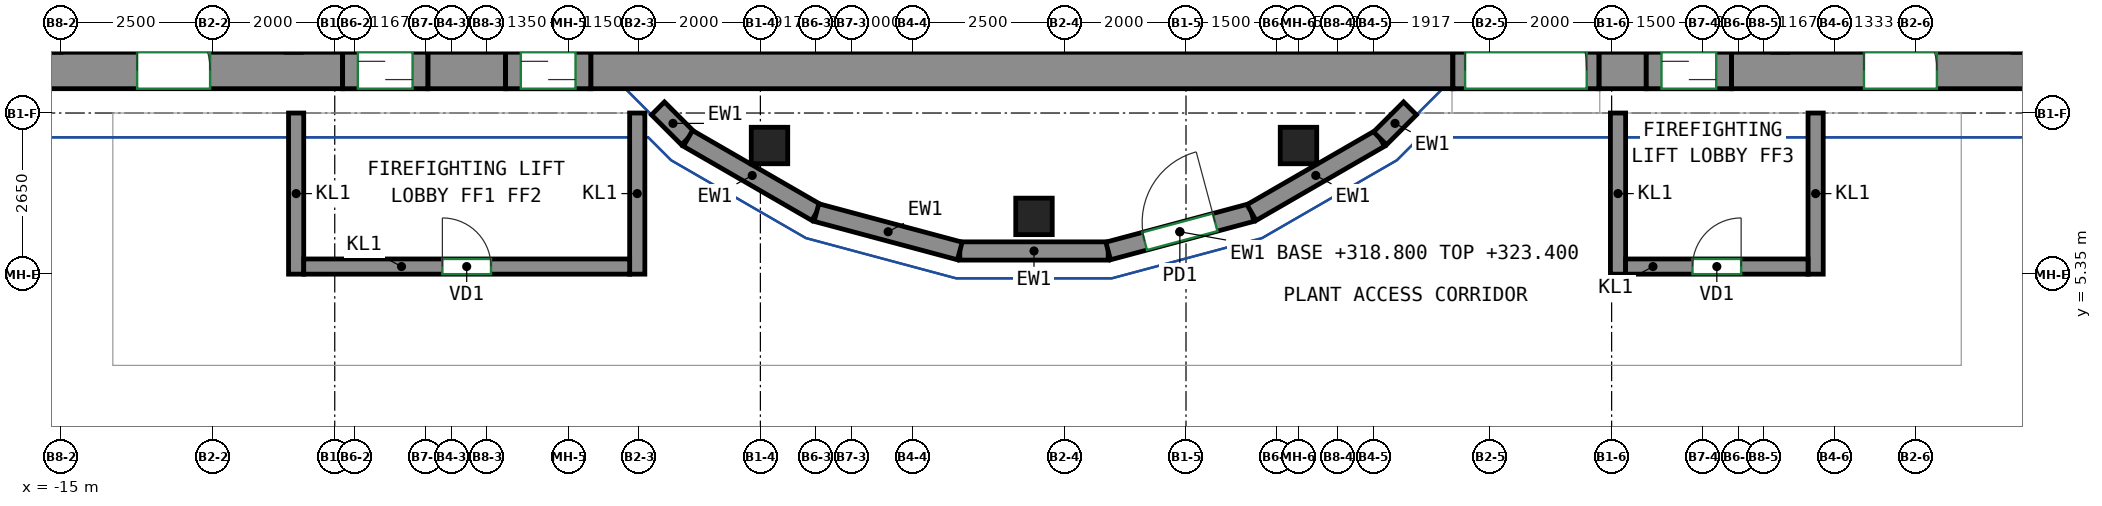
"""IFC4 building model, lengths in metres.
Left out: names, types, materials, properties, quantities, classifications, styles, units other than length and angle.
Written with IfcOpenShell. Run it as: python <this file> out.ifc"""

import sys

from ifc_helpers import new_model, si_unit, direction, frame, frame_2d, origin, origin_2d, place, context, subcontext, project, spatial, rectangle, extrude, source, transform, mapped, element, fill, save


model = new_model("IFC4")
c1 = context("Model", 3, precision=1e-05, world=origin(), true_north=direction((0.0, 1.0)))
c2 = subcontext(c1, "Body", "Model", "MODEL_VIEW")
j1 = project(units=[si_unit("LENGTHUNIT", "METRE"), si_unit("PLANEANGLEUNIT", "RADIAN")], contexts=[c1])
p1 = place(None, origin())
s1 = spatial("IfcSite", under=j1, at=p1, CompositionType="ELEMENT")
p2 = place(p1, origin())
s2 = spatial("IfcBuilding", under=s1, at=p2, CompositionType="ELEMENT")
p3 = place(p2, frame((0.0, 0.0, 318.8)))
s3 = spatial("IfcBuildingStorey", under=s2, at=p3, CompositionType="ELEMENT", Elevation=318.8)
m1 = source(origin(), c2, "Body", "SweptSolid", [
    extrude(rectangle(XDim=0.6, YDim=0.6, at=origin_2d()), origin(), (0.0, 0.0, 1.0), 4.6),
])
for number, where, z_axis, x_axis in (
    (1, (-3.35, 7.466, 0.0), (0.0, 0.0, 1.0), (1.0, 0.0, 0.0)),
    (2, (1.0, 6.3, 0.0), (0.0, 0.0, 1.0), (1.0, 0.0, 0.0)),
    (3, (5.35, 7.466, 0.0), (0.0, 0.0, 1.0), (1.0, 0.0, 0.0)),
):
    element("IfcColumn", number, at=place(p3, frame(where, z_axis=z_axis, x_axis=x_axis)), inside=s3, PredefinedType="COLUMN", context=c2, shape_type="MappedRepresentation", body=[
        mapped(m1, transform((0.0, 0.0, 0.0))),
    ])
m2 = source(origin(), c2, "Body", "SweptSolid", [
    extrude(rectangle(XDim=5.23, YDim=0.6, at=frame_2d((2.615, 0.0))), origin(), (0.0, 0.0, 1.0), 5.0),
])
p4 = place(p3, frame((-15.6, 8.7, -0.4), z_axis=(0.0, 0.0, 1.0), x_axis=(1.0, 0.0, 0.0)))
e4 = element("IfcWall", 4, at=p4, inside=s3, PredefinedType="SHEAR", context=c2, shape_type="MappedRepresentation", body=[
    mapped(m2, transform((0.0, 0.0, 0.0))),
])
p5 = place(p4, frame((1.85, 0.0, 0.4)))
e5 = element("IfcOpeningElement", 5, at=p5, cuts=e4, PredefinedType="OPENING", context=c2, shape_type="SweptSolid", body=[
    extrude(rectangle(XDim=1.2, YDim=2.1, at=frame_2d((0.6, 1.05))), frame((0.0, 0.31, 0.0), z_axis=(0.0, -1.0, 0.0), x_axis=(1.0, 0.0, 0.0)), (0.0, 0.0, 1.0), 0.62),
])
m3 = source(origin(), c2, "Body", "SweptSolid", [
    extrude(rectangle(XDim=1.28, YDim=0.6, at=frame_2d((0.64, 0.0))), origin(), (0.0, 0.0, 1.0), 5.0),
])
p6 = place(p3, frame((-8.97, 8.7, -0.4), z_axis=(0.0, 0.0, 1.0), x_axis=(1.0, 0.0, 0.0)))
e6 = element("IfcWall", 6, at=p6, inside=s3, PredefinedType="SHEAR", context=c2, shape_type="MappedRepresentation", body=[
    mapped(m3, transform((0.0, 0.0, 0.0))),
])
m4 = source(origin(), c2, "Body", "SweptSolid", [
    extrude(rectangle(XDim=14.18, YDim=0.6, at=frame_2d((7.09, 0.0))), origin(), (0.0, 0.0, 1.0), 4.6),
])
p7 = place(p3, frame((-6.29, 8.7, 0.0), z_axis=(0.0, 0.0, 1.0), x_axis=(1.0, 0.0, 0.0)))
e7 = element("IfcWall", 7, at=p7, inside=s3, PredefinedType="SHEAR", context=c2, shape_type="MappedRepresentation", body=[
    mapped(m4, transform((0.0, 0.0, 0.0))),
])
m5 = source(origin(), c2, "Body", "SweptSolid", [
    extrude(rectangle(XDim=0.78, YDim=0.6, at=frame_2d((0.39, 0.0))), origin(), (0.0, 0.0, 1.0), 5.0),
])
p8 = place(p3, frame((10.29, 8.7, -0.4), z_axis=(0.0, 0.0, 1.0), x_axis=(1.0, 0.0, 0.0)))
e8 = element("IfcWall", 8, at=p8, inside=s3, PredefinedType="SHEAR", context=c2, shape_type="MappedRepresentation", body=[
    mapped(m5, transform((0.0, 0.0, 0.0))),
])
p9 = place(p3, frame((12.47, 8.7, -0.4), z_axis=(0.0, 0.0, 1.0), x_axis=(1.0, 0.0, 0.0)))
e9 = element("IfcWall", 9, at=p9, inside=s3, PredefinedType="SHEAR", context=c2, shape_type="MappedRepresentation", body=[
    mapped(m2, transform((0.0, 0.0, 0.0))),
])
p10 = place(p9, frame((2.18, 0.0, 0.4)))
e10 = element("IfcOpeningElement", 10, at=p10, cuts=e9, PredefinedType="OPENING", context=c2, shape_type="SweptSolid", body=[
    extrude(rectangle(XDim=1.2, YDim=2.1, at=frame_2d((0.6, 1.05))), frame((0.0, 0.31, 0.0), z_axis=(0.0, -1.0, 0.0), x_axis=(1.0, 0.0, 0.0)), (0.0, 0.0, 1.0), 0.62),
])
m6 = source(origin(), c2, "Body", "SweptSolid", [
    extrude(rectangle(XDim=1.4, YDim=0.6, at=frame_2d((0.7, 0.0))), origin(), (0.0, 0.0, 1.0), 0.7),
])
p11 = place(p3, frame((-10.37, 8.7, 3.9), z_axis=(0.0, 0.0, 1.0), x_axis=(1.0, 0.0, 0.0)))
e11 = element("IfcWall", 11, at=p11, inside=s3, PredefinedType="SHEAR", context=c2, shape_type="MappedRepresentation", body=[
    mapped(m6, transform((0.0, 0.0, 0.0))),
])
m7 = source(origin(), c2, "Body", "SweptSolid", [
    extrude(rectangle(XDim=1.4, YDim=0.6, at=frame_2d((0.7, 0.0))), origin(), (0.0, 0.0, 1.0), 0.65),
])
p12 = place(p3, frame((-7.69, 8.7, 3.95), z_axis=(0.0, 0.0, 1.0), x_axis=(1.0, 0.0, 0.0)))
e12 = element("IfcWall", 12, at=p12, inside=s3, PredefinedType="SHEAR", context=c2, shape_type="MappedRepresentation", body=[
    mapped(m7, transform((0.0, 0.0, 0.0))),
])
m8 = source(origin(), c2, "Body", "SweptSolid", [
    extrude(rectangle(XDim=2.4, YDim=0.6, at=frame_2d((1.2, 0.0))), origin(), (0.0, 0.0, 1.0), 0.4),
])
p13 = place(p3, frame((7.89, 8.7, 4.2), z_axis=(0.0, 0.0, 1.0), x_axis=(1.0, 0.0, 0.0)))
e13 = element("IfcWall", 13, at=p13, inside=s3, PredefinedType="SHEAR", context=c2, shape_type="MappedRepresentation", body=[
    mapped(m8, transform((0.0, 0.0, 0.0))),
])
p14 = place(p3, frame((11.07, 8.7, 3.95), z_axis=(0.0, 0.0, 1.0), x_axis=(1.0, 0.0, 0.0)))
e14 = element("IfcWall", 14, at=p14, inside=s3, PredefinedType="SHEAR", context=c2, shape_type="MappedRepresentation", body=[
    mapped(m7, transform((0.0, 0.0, 0.0))),
])
m9 = source(origin(), c2, "Body", "SweptSolid", [
    extrude(rectangle(XDim=2.44, YDim=0.3, at=frame_2d((1.22, 0.0))), origin(), (0.0, 0.0, 1.0), 1.2),
])
p15 = place(p3, frame((-0.22, 5.731, 0.0), z_axis=(0.0, 0.0, 1.0), x_axis=(1.0, 0.0, 0.0)))
e15 = element("IfcWall", 15, at=p15, inside=s3, PredefinedType="SOLIDWALL", context=c2, shape_type="MappedRepresentation", body=[
    mapped(m9, transform((0.0, 0.0, 0.0))),
])
m10 = source(origin(), c2, "Body", "SweptSolid", [
    extrude(rectangle(XDim=2.441, YDim=0.3, at=frame_2d((1.22, 0.0))), origin(), (0.0, 0.0, 1.0), 4.6),
])
p16 = place(p3, frame((2.22, 5.731, 0.0), z_axis=(0.0, 0.0, 1.0), x_axis=(0.96593376363, 0.258789420724, 0.0)))
e16 = element("IfcWall", 16, at=p16, inside=s3, PredefinedType="SOLIDWALL", context=c2, shape_type="MappedRepresentation", body=[
    mapped(m10, transform((0.0, 0.0, 0.0))),
])
p17 = place(p16, frame((0.62, 0.0, 0.0)))
e17 = element("IfcOpeningElement", 17, at=p17, cuts=e16, PredefinedType="OPENING", context=c2, shape_type="SweptSolid", body=[
    extrude(rectangle(XDim=1.2, YDim=2.1, at=frame_2d((0.6, 1.05))), frame((0.0, 0.16, 0.0), z_axis=(0.0, -1.0, 0.0), x_axis=(1.0, 0.0, 0.0)), (0.0, 0.0, 1.0), 0.32),
])
p18 = place(p3, frame((4.578, 6.363, 0.0), z_axis=(0.0, 0.0, 1.0), x_axis=(0.866030657337, 0.49999090047, 0.0)))
e18 = element("IfcWall", 18, at=p18, inside=s3, PredefinedType="SOLIDWALL", context=c2, shape_type="MappedRepresentation", body=[
    mapped(m9, transform((0.0, 0.0, 0.0))),
])
m11 = source(origin(), c2, "Body", "SweptSolid", [
    extrude(rectangle(XDim=0.697, YDim=0.3, at=frame_2d((0.349, 0.0))), origin(), (0.0, 0.0, 1.0), 1.2),
])
for number, where, z_axis, x_axis in (
    (19, (6.691, 7.583, 0.0), (0.0, 0.0, 1.0), (0.707, 0.707, 0.0)),
    (20, (-5.184, 8.076, 0.0), (0.0, 0.0, 1.0), (0.707, -0.707, 0.0)),
):
    element("IfcWall", number, at=place(p3, frame(where, z_axis=z_axis, x_axis=x_axis)), inside=s3, PredefinedType="SOLIDWALL", context=c2, shape_type="MappedRepresentation", body=[
        mapped(m11, transform((0.0, 0.0, 0.0))),
    ])
p19 = place(p3, frame((-4.691, 7.583, 0.0), z_axis=(0.0, 0.0, 1.0), x_axis=(0.866030657337, -0.49999090047, 0.0)))
e21 = element("IfcWall", 21, at=p19, inside=s3, PredefinedType="SOLIDWALL", context=c2, shape_type="MappedRepresentation", body=[
    mapped(m9, transform((0.0, 0.0, 0.0))),
])
m12 = source(origin(), c2, "Body", "SweptSolid", [
    extrude(rectangle(XDim=2.441, YDim=0.3, at=frame_2d((1.22, 0.0))), origin(), (0.0, 0.0, 1.0), 1.2),
])
p20 = place(p3, frame((-2.578, 6.363, 0.0), z_axis=(0.0, 0.0, 1.0), x_axis=(0.96593376363, -0.258789420724, 0.0)))
e22 = element("IfcWall", 22, at=p20, inside=s3, PredefinedType="SOLIDWALL", context=c2, shape_type="MappedRepresentation", body=[
    mapped(m12, transform((0.0, 0.0, 0.0))),
])
m13 = source(origin(), c2, "Body", "SweptSolid", [
    extrude(rectangle(XDim=2.65, YDim=0.25, at=frame_2d((1.325, 0.0))), origin(), (0.0, 0.0, 1.0), 4.6),
])
for number, where, z_axis, x_axis in (
    (23, (-11.135, 5.35, 0.0), (0.0, 0.0, 1.0), (0.0, 1.0, 0.0)),
    (24, (-5.525, 5.35, 0.0), (0.0, 0.0, 1.0), (0.0, 1.0, 0.0)),
):
    element("IfcWall", number, at=place(p3, frame(where, z_axis=z_axis, x_axis=x_axis)), inside=s3, PredefinedType="PARTITIONING", context=c2, shape_type="MappedRepresentation", body=[
        mapped(m13, transform((0.0, 0.0, 0.0))),
    ])
m14 = source(origin(), c2, "Body", "SweptSolid", [
    extrude(rectangle(XDim=5.36, YDim=0.25, at=frame_2d((2.68, 0.0))), origin(), (0.0, 0.0, 1.0), 4.6),
])
p21 = place(p3, frame((-11.01, 5.475, 0.0), z_axis=(0.0, 0.0, 1.0), x_axis=(1.0, 0.0, 0.0)))
e25 = element("IfcWall", 25, at=p21, inside=s3, PredefinedType="PARTITIONING", context=c2, shape_type="MappedRepresentation", body=[
    mapped(m14, transform((0.0, 0.0, 0.0))),
])
p22 = place(p21, frame((2.28, 0.0, 0.0)))
e26 = element("IfcOpeningElement", 26, at=p22, cuts=e25, PredefinedType="OPENING", context=c2, shape_type="SweptSolid", body=[
    extrude(rectangle(XDim=0.8, YDim=2.0, at=frame_2d((0.4, 1.0))), frame((0.0, 0.135, 0.0), z_axis=(0.0, -1.0, 0.0), x_axis=(1.0, 0.0, 0.0)), (0.0, 0.0, 1.0), 0.27),
])
for number, where, z_axis, x_axis in (
    (27, (10.605, 5.35, 0.0), (0.0, 0.0, 1.0), (0.0, 1.0, 0.0)),
    (28, (13.855, 5.35, 0.0), (0.0, 0.0, 1.0), (0.0, 1.0, 0.0)),
):
    element("IfcWall", number, at=place(p3, frame(where, z_axis=z_axis, x_axis=x_axis)), inside=s3, PredefinedType="PARTITIONING", context=c2, shape_type="MappedRepresentation", body=[
        mapped(m13, transform((0.0, 0.0, 0.0))),
    ])
m15 = source(origin(), c2, "Body", "SweptSolid", [
    extrude(rectangle(XDim=3.0, YDim=0.25, at=frame_2d((1.5, 0.0))), origin(), (0.0, 0.0, 1.0), 4.6),
])
p23 = place(p3, frame((10.73, 5.475, 0.0), z_axis=(0.0, 0.0, 1.0), x_axis=(1.0, 0.0, 0.0)))
e29 = element("IfcWall", 29, at=p23, inside=s3, PredefinedType="PARTITIONING", context=c2, shape_type="MappedRepresentation", body=[
    mapped(m15, transform((0.0, 0.0, 0.0))),
])
p24 = place(p23, frame((1.1, 0.0, 0.0)))
e30 = element("IfcOpeningElement", 30, at=p24, cuts=e29, PredefinedType="OPENING", context=c2, shape_type="SweptSolid", body=[
    extrude(rectangle(XDim=0.8, YDim=2.0, at=frame_2d((0.4, 1.0))), frame((0.0, 0.135, 0.0), z_axis=(0.0, -1.0, 0.0), x_axis=(1.0, 0.0, 0.0)), (0.0, 0.0, 1.0), 0.27),
])
m16 = source(origin(), c2, "Body", "SweptSolid", [
    extrude(rectangle(XDim=1.4, YDim=0.6, at=frame_2d((0.7, 0.0))), origin(), (0.0, 0.0, 1.0), 2.7),
])
p25 = place(p3, frame((-10.37, 8.7, 0.0), z_axis=(0.0, 0.0, 1.0), x_axis=(1.0, 0.0, 0.0)))
e31 = element("IfcWall", 31, at=p25, inside=s3, PredefinedType="PARTITIONING", context=c2, shape_type="MappedRepresentation", body=[
    mapped(m16, transform((0.0, 0.0, 0.0))),
])
p26 = place(p25, frame((0.25, 0.0, 0.0)))
e32 = element("IfcOpeningElement", 32, at=p26, cuts=e31, PredefinedType="OPENING", context=c2, shape_type="SweptSolid", body=[
    extrude(rectangle(XDim=0.9, YDim=2.1, at=frame_2d((0.45, 1.05))), frame((0.0, 0.31, 0.0), z_axis=(0.0, -1.0, 0.0), x_axis=(1.0, 0.0, 0.0)), (0.0, 0.0, 1.0), 0.62),
])
m17 = source(origin(), c2, "Body", "SweptSolid", [
    extrude(rectangle(XDim=1.4, YDim=0.6, at=frame_2d((0.7, 0.0))), origin(), (0.0, 0.0, 1.0), 2.7),
])
p27 = place(p3, frame((-7.69, 8.7, 0.0), z_axis=(0.0, 0.0, 1.0), x_axis=(1.0, 0.0, 0.0)))
e33 = element("IfcWall", 33, at=p27, inside=s3, PredefinedType="PARTITIONING", context=c2, shape_type="MappedRepresentation", body=[
    mapped(m17, transform((0.0, 0.0, 0.0))),
])
p28 = place(p27, frame((0.25, 0.0, 0.0)))
e34 = element("IfcOpeningElement", 34, at=p28, cuts=e33, PredefinedType="OPENING", context=c2, shape_type="SweptSolid", body=[
    extrude(rectangle(XDim=0.9, YDim=2.1, at=frame_2d((0.45, 1.05))), frame((0.0, 0.31, 0.0), z_axis=(0.0, -1.0, 0.0), x_axis=(1.0, 0.0, 0.0)), (0.0, 0.0, 1.0), 0.62),
])
m18 = source(origin(), c2, "Body", "SweptSolid", [
    extrude(rectangle(XDim=2.4, YDim=0.6, at=frame_2d((1.2, 0.0))), origin(), (0.0, 0.0, 1.0), 2.7),
])
p29 = place(p3, frame((7.89, 8.7, 0.0), z_axis=(0.0, 0.0, 1.0), x_axis=(1.0, 0.0, 0.0)))
e35 = element("IfcWall", 35, at=p29, inside=s3, PredefinedType="PARTITIONING", context=c2, shape_type="MappedRepresentation", body=[
    mapped(m18, transform((0.0, 0.0, 0.0))),
])
p30 = place(p29, frame((0.2, 0.0, 0.0)))
e36 = element("IfcOpeningElement", 36, at=p30, cuts=e35, PredefinedType="OPENING", context=c2, shape_type="SweptSolid", body=[
    extrude(rectangle(XDim=2.0, YDim=2.1, at=frame_2d((1.0, 1.05))), frame((0.0, 0.31, 0.0), z_axis=(0.0, -1.0, 0.0), x_axis=(1.0, 0.0, 0.0)), (0.0, 0.0, 1.0), 0.62),
])
p31 = place(p3, frame((11.07, 8.7, 0.0), z_axis=(0.0, 0.0, 1.0), x_axis=(1.0, 0.0, 0.0)))
e37 = element("IfcWall", 37, at=p31, inside=s3, PredefinedType="PARTITIONING", context=c2, shape_type="MappedRepresentation", body=[
    mapped(m17, transform((0.0, 0.0, 0.0))),
])
p32 = place(p31, frame((0.25, 0.0, 0.0)))
e38 = element("IfcOpeningElement", 38, at=p32, cuts=e37, PredefinedType="OPENING", context=c2, shape_type="SweptSolid", body=[
    extrude(rectangle(XDim=0.9, YDim=2.1, at=frame_2d((0.45, 1.05))), frame((0.0, 0.31, 0.0), z_axis=(0.0, -1.0, 0.0), x_axis=(1.0, 0.0, 0.0)), (0.0, 0.0, 1.0), 0.62),
])
p33 = place(p17, origin())
e39 = element("IfcDoor", 39, at=p33, inside=s3, OperationType="SINGLE_SWING_RIGHT", PredefinedType="DOOR", context=c2, shape_type="SweptSolid", body=[
    extrude(rectangle(XDim=1.2, YDim=2.1, at=frame_2d((0.6, 1.05))), frame((0.0, 0.025, 0.0), z_axis=(0.0, -1.0, 0.0), x_axis=(1.0, 0.0, 0.0)), (0.0, 0.0, 1.0), 0.05),
])
fill(e17, e39)
p34 = place(p30, origin())
e40 = element("IfcDoor", 40, at=p34, inside=s3, OperationType="DOUBLE_DOOR_SINGLE_SWING", PredefinedType="DOOR", context=c2, shape_type="SweptSolid", body=[
    extrude(rectangle(XDim=2.0, YDim=2.1, at=frame_2d((1.0, 1.05))), frame((0.0, 0.205, 0.0), z_axis=(0.0, -1.0, 0.0), x_axis=(1.0, 0.0, 0.0)), (0.0, 0.0, 1.0), 0.05),
])
fill(e36, e40)
p35 = place(p22, origin())
e41 = element("IfcDoor", 41, at=p35, inside=s3, OperationType="SINGLE_SWING_LEFT", PredefinedType="DOOR", context=c2, shape_type="SweptSolid", body=[
    extrude(rectangle(XDim=0.8, YDim=2.0, at=frame_2d((0.4, 1.0))), frame((0.0, 0.025, 0.0), z_axis=(0.0, -1.0, 0.0), x_axis=(1.0, 0.0, 0.0)), (0.0, 0.0, 1.0), 0.05),
])
fill(e26, e41)
p36 = place(p24, origin())
e42 = element("IfcDoor", 42, at=p36, inside=s3, OperationType="SINGLE_SWING_RIGHT", PredefinedType="DOOR", context=c2, shape_type="SweptSolid", body=[
    extrude(rectangle(XDim=0.8, YDim=2.0, at=frame_2d((0.4, 1.0))), frame((0.0, 0.025, 0.0), z_axis=(0.0, -1.0, 0.0), x_axis=(1.0, 0.0, 0.0)), (0.0, 0.0, 1.0), 0.05),
])
fill(e30, e42)
p37 = place(p26, origin())
e43 = element("IfcDoor", 43, at=p37, inside=s3, OperationType="SLIDING_TO_LEFT", PredefinedType="DOOR", context=c2, shape_type="SweptSolid", body=[
    extrude(rectangle(XDim=0.9, YDim=2.1, at=frame_2d((0.45, 1.05))), frame((0.0, 0.205, 0.0), z_axis=(0.0, -1.0, 0.0), x_axis=(1.0, 0.0, 0.0)), (0.0, 0.0, 1.0), 0.05),
])
fill(e32, e43)
p38 = place(p28, origin())
e44 = element("IfcDoor", 44, at=p38, inside=s3, OperationType="SLIDING_TO_RIGHT", PredefinedType="DOOR", context=c2, shape_type="SweptSolid", body=[
    extrude(rectangle(XDim=0.9, YDim=2.1, at=frame_2d((0.45, 1.05))), frame((0.0, 0.205, 0.0), z_axis=(0.0, -1.0, 0.0), x_axis=(1.0, 0.0, 0.0)), (0.0, 0.0, 1.0), 0.05),
])
fill(e34, e44)
p39 = place(p32, origin())
e45 = element("IfcDoor", 45, at=p39, inside=s3, OperationType="SLIDING_TO_LEFT", PredefinedType="DOOR", context=c2, shape_type="SweptSolid", body=[
    extrude(rectangle(XDim=0.9, YDim=2.1, at=frame_2d((0.45, 1.05))), frame((0.0, 0.205, 0.0), z_axis=(0.0, -1.0, 0.0), x_axis=(1.0, 0.0, 0.0)), (0.0, 0.0, 1.0), 0.05),
])
fill(e38, e45)
p40 = place(p5, origin())
e46 = element("IfcDoor", 46, at=p40, inside=s3, OperationType="DOUBLE_DOOR_SINGLE_SWING", PredefinedType="DOOR", context=c2, shape_type="SweptSolid", body=[
    extrude(rectangle(XDim=1.2, YDim=2.1, at=frame_2d((0.6, 1.05))), frame((0.0, 0.205, 0.0), z_axis=(0.0, -1.0, 0.0), x_axis=(1.0, 0.0, 0.0)), (0.0, 0.0, 1.0), 0.05),
])
fill(e5, e46)
p41 = place(p10, origin())
e47 = element("IfcDoor", 47, at=p41, inside=s3, OperationType="DOUBLE_DOOR_SINGLE_SWING", PredefinedType="DOOR", context=c2, shape_type="SweptSolid", body=[
    extrude(rectangle(XDim=1.2, YDim=2.1, at=frame_2d((0.6, 1.05))), frame((0.0, 0.205, 0.0), z_axis=(0.0, -1.0, 0.0), x_axis=(1.0, 0.0, 0.0)), (0.0, 0.0, 1.0), 0.05),
])
fill(e10, e47)
save(model, sys.argv[1])
